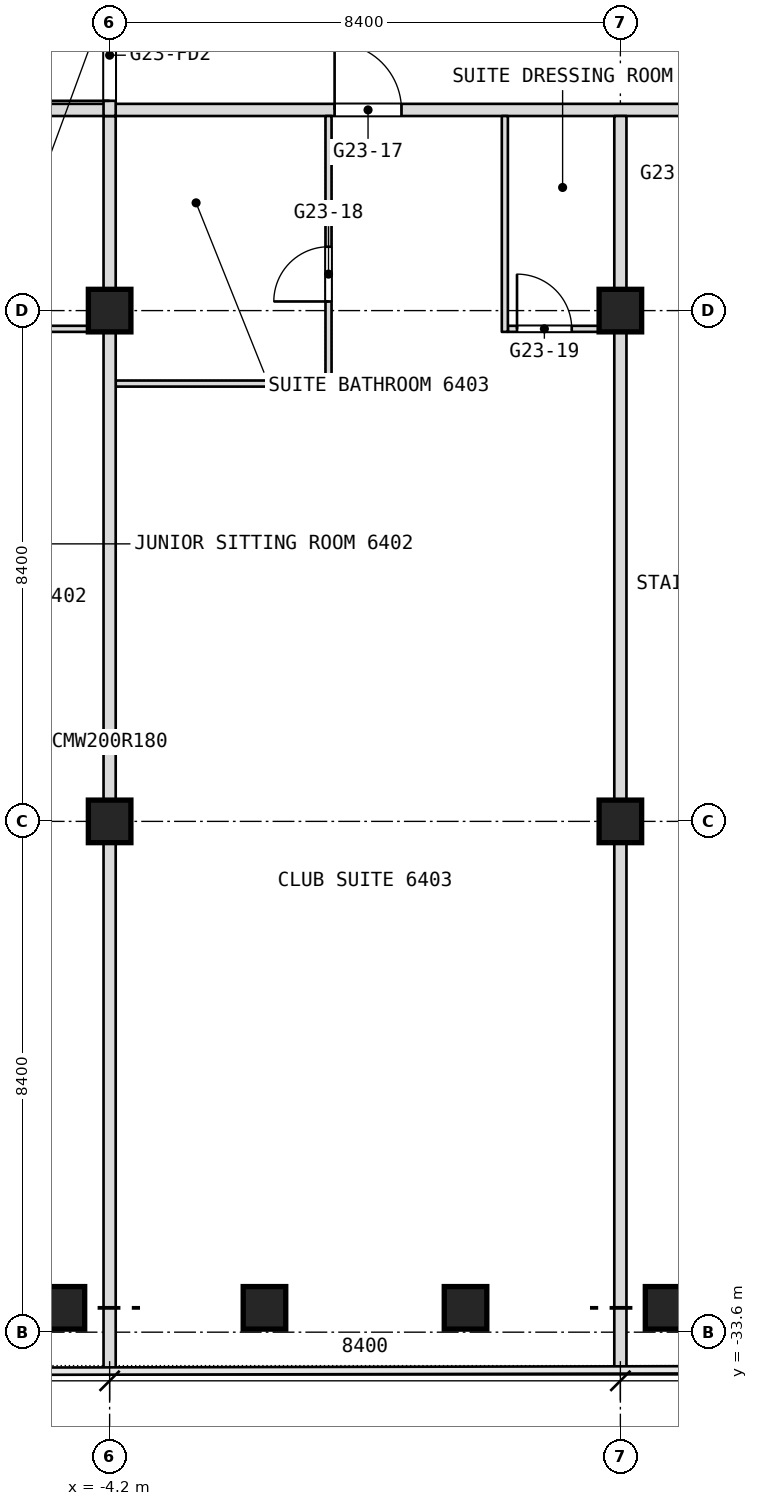
"""IFC4 building model, lengths in metres.
Left out: names, types, materials, properties, quantities, classifications, styles, units other than length and angle.
Written with IfcOpenShell. Run it as: python <this file> out.ifc"""

import sys

from ifc_helpers import new_model, si_unit, direction, frame, frame_2d, origin, origin_2d, place, context, subcontext, project, spatial, rectangle, extrude, element, fill, save


model = new_model("IFC4")
c1 = context("Model", 3, precision=1e-05, world=origin(), true_north=direction((0.0, 1.0)))
c2 = subcontext(c1, "Body", "Model", "MODEL_VIEW")
j1 = project(units=[si_unit("LENGTHUNIT", "METRE"), si_unit("PLANEANGLEUNIT", "RADIAN")], contexts=[c1])
p1 = place(None, origin())
s1 = spatial("IfcSite", under=j1, at=p1, CompositionType="ELEMENT")
p2 = place(p1, origin())
s2 = spatial("IfcBuilding", under=s1, at=p2, CompositionType="ELEMENT")
p3 = place(p2, frame((0.0, 0.0, 277.7)))
s3 = spatial("IfcBuildingStorey", under=s2, at=p3, CompositionType="ELEMENT", Elevation=277.7)
for number, where, z_axis, x_axis in (
    (1, (-4.2, -25.2, 0.0), (0.0, 0.0, 1.0), (1.0, 0.0, 0.0)),
    (2, (-4.2, -16.8, 0.0), (0.0, 0.0, 1.0), (1.0, 0.0, 0.0)),
    (3, (4.2, -25.2, 0.0), (0.0, 0.0, 1.0), (1.0, 0.0, 0.0)),
    (4, (4.2, -16.8, 0.0), (0.0, 0.0, 1.0), (1.0, 0.0, 0.0)),
):
    element("IfcColumn", number, at=place(p3, frame(where, z_axis=z_axis, x_axis=x_axis)), inside=s3, PredefinedType="COLUMN", context=c2, shape_type="SweptSolid", body=[
        extrude(rectangle(XDim=0.7, YDim=0.7, at=origin_2d()), origin(), (0.0, 0.0, 1.0), 3.6),
    ])
p4 = place(p3, frame((-4.1, -18.0, 0.0), z_axis=(0.0, 0.0, 1.0), x_axis=(1.0, 0.0, 0.0)))
e5 = element("IfcWall", 5, at=p4, inside=s3, PredefinedType="PARTITIONING", context=c2, shape_type="SweptSolid", body=[
    extrude(rectangle(XDim=3.55, YDim=0.1, at=frame_2d((1.775, 0.0))), origin(), (0.0, 0.0, 1.0), 3.34),
])
p5 = place(p3, frame((-6.55, -17.1, 0.0), z_axis=(0.0, 0.0, 1.0), x_axis=(1.0, 0.0, 0.0)))
e6 = element("IfcWall", 6, at=p5, inside=s3, PredefinedType="PARTITIONING", context=c2, shape_type="SweptSolid", body=[
    extrude(rectangle(XDim=2.45, YDim=0.1, at=frame_2d((1.225, 0.0))), origin(), (0.0, 0.0, 1.0), 3.34),
])
p6 = place(p5, frame((0.15, 0.0, 0.0)))
e7 = element("IfcOpeningElement", 7, at=p6, cuts=e6, PredefinedType="OPENING", context=c2, shape_type="SweptSolid", body=[
    extrude(rectangle(XDim=0.9, YDim=2.1, at=frame_2d((0.45, 1.05))), frame((0.0, 0.05, 0.0), z_axis=(0.0, -1.0, 0.0), x_axis=(1.0, 0.0, 0.0)), (0.0, 0.0, 1.0), 0.1),
])
p7 = place(p3, frame((2.35, -17.1, 0.0), z_axis=(0.0, 0.0, 1.0), x_axis=(1.0, 0.0, 0.0)))
e8 = element("IfcWall", 8, at=p7, inside=s3, PredefinedType="PARTITIONING", context=c2, shape_type="SweptSolid", body=[
    extrude(rectangle(XDim=1.95, YDim=0.1, at=frame_2d((0.975, 0.0))), origin(), (0.0, 0.0, 1.0), 3.34),
])
p8 = place(p7, frame((0.15, 0.0, 0.0)))
e9 = element("IfcOpeningElement", 9, at=p8, cuts=e8, PredefinedType="OPENING", context=c2, shape_type="SweptSolid", body=[
    extrude(rectangle(XDim=0.9, YDim=2.1, at=frame_2d((0.45, 1.05))), frame((0.0, 0.05, 0.0), z_axis=(0.0, -1.0, 0.0), x_axis=(1.0, 0.0, 0.0)), (0.0, 0.0, 1.0), 0.1),
])
p9 = place(p3, frame((-10.0, -13.5, 0.0), z_axis=(0.0, 0.0, 1.0), x_axis=(1.0, 0.0, 0.0)))
e10 = element("IfcWall", 10, at=p9, inside=s3, PredefinedType="PARTITIONING", context=c2, shape_type="SweptSolid", body=[
    extrude(rectangle(XDim=16.0, YDim=0.2, at=frame_2d((8.0, 0.0))), origin(), (0.0, 0.0, 1.0), 3.34),
])
p10 = place(p9, frame((0.25, 0.0, 0.0)))
e11 = element("IfcOpeningElement", 11, at=p10, cuts=e10, PredefinedType="OPENING", context=c2, shape_type="SweptSolid", body=[
    extrude(rectangle(XDim=1.1, YDim=2.1, at=frame_2d((0.55, 1.05))), frame((0.0, 0.1, 0.0), z_axis=(0.0, -1.0, 0.0), x_axis=(1.0, 0.0, 0.0)), (0.0, 0.0, 1.0), 0.2),
])
p11 = place(p9, frame((9.5, 0.0, 0.0)))
e12 = element("IfcOpeningElement", 12, at=p11, cuts=e10, PredefinedType="OPENING", context=c2, shape_type="SweptSolid", body=[
    extrude(rectangle(XDim=1.1, YDim=2.1, at=frame_2d((0.55, 1.05))), frame((0.0, 0.1, 0.0), z_axis=(0.0, -1.0, 0.0), x_axis=(1.0, 0.0, 0.0)), (0.0, 0.0, 1.0), 0.2),
])
p12 = place(p3, frame((4.2, -34.2, 0.0), z_axis=(0.0, 0.0, 1.0), x_axis=(0.0, 1.0, 0.0)))
e13 = element("IfcWall", 13, at=p12, inside=s3, PredefinedType="PARTITIONING", context=c2, shape_type="SweptSolid", body=[
    extrude(rectangle(XDim=20.6, YDim=0.2, at=frame_2d((10.3, 0.0))), origin(), (0.0, 0.0, 1.0), 3.34),
])
p13 = place(p3, frame((2.3, -17.15, 0.0), z_axis=(0.0, 0.0, 1.0), x_axis=(0.0, 1.0, 0.0)))
e14 = element("IfcWall", 14, at=p13, inside=s3, PredefinedType="PARTITIONING", context=c2, shape_type="SweptSolid", body=[
    extrude(rectangle(XDim=3.55, YDim=0.1, at=frame_2d((1.775, 0.0))), origin(), (0.0, 0.0, 1.0), 3.34),
])
p14 = place(p3, frame((-0.6, -17.95, 0.0), z_axis=(0.0, 0.0, 1.0), x_axis=(0.0, 1.0, 0.0)))
e15 = element("IfcWall", 15, at=p14, inside=s3, PredefinedType="PARTITIONING", context=c2, shape_type="SweptSolid", body=[
    extrude(rectangle(XDim=4.35, YDim=0.1, at=frame_2d((2.175, 0.0))), origin(), (0.0, 0.0, 1.0), 3.34),
])
p15 = place(p14, frame((1.3, 0.0, 0.0)))
e16 = element("IfcOpeningElement", 16, at=p15, cuts=e15, PredefinedType="OPENING", context=c2, shape_type="SweptSolid", body=[
    extrude(rectangle(XDim=0.9, YDim=2.1, at=frame_2d((0.45, 1.05))), frame((0.0, 0.05, 0.0), z_axis=(0.0, -1.0, 0.0), x_axis=(1.0, 0.0, 0.0)), (0.0, 0.0, 1.0), 0.1),
])
p16 = place(p3, frame((-4.2, -34.2, 0.0), z_axis=(0.0, 0.0, 1.0), x_axis=(0.0, 1.0, 0.0)))
e17 = element("IfcWall", 17, at=p16, inside=s3, PredefinedType="PARTITIONING", context=c2, shape_type="SweptSolid", body=[
    extrude(rectangle(XDim=20.6, YDim=0.2, at=frame_2d((10.3, 0.0))), origin(), (0.0, 0.0, 1.0), 3.34),
])
p17 = place(p3, frame((-4.2, -13.6, 0.0), z_axis=(0.0, 0.0, 1.0), x_axis=(0.0, 1.0, 0.0)))
e18 = element("IfcWall", 18, at=p17, inside=s3, PredefinedType="PARTITIONING", context=c2, shape_type="SweptSolid", body=[
    extrude(rectangle(XDim=13.6, YDim=0.2, at=frame_2d((6.8, 0.0))), origin(), (0.0, 0.0, 1.0), 3.34),
])
p18 = place(p17, frame((11.95, 0.0, 0.0)))
e19 = element("IfcOpeningElement", 19, at=p18, cuts=e18, PredefinedType="OPENING", context=c2, shape_type="SweptSolid", body=[
    extrude(rectangle(XDim=1.5, YDim=2.1, at=frame_2d((0.75, 1.05))), frame((0.0, 0.1, 0.0), z_axis=(0.0, -1.0, 0.0), x_axis=(1.0, 0.0, 0.0)), (0.0, 0.0, 1.0), 0.2),
])
p19 = place(p17, frame((0.25, 0.0, 0.0)))
e20 = element("IfcOpeningElement", 20, at=p19, cuts=e18, PredefinedType="OPENING", context=c2, shape_type="SweptSolid", body=[
    extrude(rectangle(XDim=1.5, YDim=2.1, at=frame_2d((0.75, 1.05))), frame((0.0, 0.1, 0.0), z_axis=(0.0, -1.0, 0.0), x_axis=(1.0, 0.0, 0.0)), (0.0, 0.0, 1.0), 0.2),
])
p20 = place(p11, origin())
e21 = element("IfcDoor", 21, at=p20, inside=s3, OperationType="SINGLE_SWING_RIGHT", PredefinedType="DOOR", context=c2, shape_type="SweptSolid", body=[
    extrude(rectangle(XDim=1.1, YDim=2.1, at=frame_2d((0.55, 1.05))), frame((0.0, 0.025, 0.0), z_axis=(0.0, -1.0, 0.0), x_axis=(1.0, 0.0, 0.0)), (0.0, 0.0, 1.0), 0.05),
])
fill(e12, e21)
p21 = place(p15, origin())
e22 = element("IfcDoor", 22, at=p21, inside=s3, OperationType="SINGLE_SWING_LEFT", PredefinedType="DOOR", context=c2, shape_type="SweptSolid", body=[
    extrude(rectangle(XDim=0.9, YDim=2.1, at=frame_2d((0.45, 1.05))), frame((0.0, 0.025, 0.0), z_axis=(0.0, -1.0, 0.0), x_axis=(1.0, 0.0, 0.0)), (0.0, 0.0, 1.0), 0.05),
])
fill(e16, e22)
p22 = place(p8, origin())
e23 = element("IfcDoor", 23, at=p22, inside=s3, OperationType="SINGLE_SWING_LEFT", PredefinedType="DOOR", context=c2, shape_type="SweptSolid", body=[
    extrude(rectangle(XDim=0.9, YDim=2.1, at=frame_2d((0.45, 1.05))), frame((0.0, 0.025, 0.0), z_axis=(0.0, -1.0, 0.0), x_axis=(1.0, 0.0, 0.0)), (0.0, 0.0, 1.0), 0.05),
])
fill(e9, e23)
p23 = place(p19, origin())
e24 = element("IfcDoor", 24, at=p23, inside=s3, OperationType="DOUBLE_DOOR_DOUBLE_SWING", PredefinedType="DOOR", context=c2, shape_type="SweptSolid", body=[
    extrude(rectangle(XDim=1.5, YDim=2.1, at=frame_2d((0.75, 1.05))), frame((0.0, 0.025, 0.0), z_axis=(0.0, -1.0, 0.0), x_axis=(1.0, 0.0, 0.0)), (0.0, 0.0, 1.0), 0.05),
])
fill(e20, e24)
save(model, sys.argv[1])
